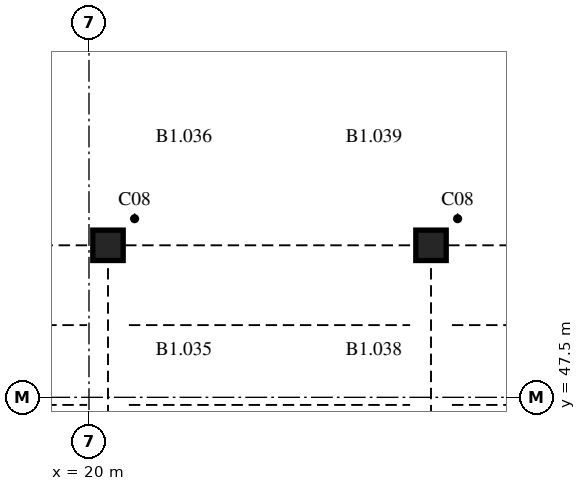
"""IFC4 building model, lengths in metres.
Left out: names, types, materials, properties, quantities, classifications, styles, units other than length and angle.
Written with IfcOpenShell. Run it as: python <this file> out.ifc"""

import sys

from ifc_helpers import new_model, si_unit, direction, frame, origin, origin_2d, place, context, subcontext, project, spatial, rectangle, extrude, element, save


model = new_model("IFC4")
c1 = context("Model", 3, precision=1e-05, world=origin(), true_north=direction((0.0, 1.0)))
c2 = subcontext(c1, "Body", "Model", "MODEL_VIEW")
j1 = project(units=[si_unit("LENGTHUNIT", "METRE"), si_unit("PLANEANGLEUNIT", "RADIAN")], contexts=[c1])
p1 = place(None, origin())
s1 = spatial("IfcSite", under=j1, at=p1, CompositionType="ELEMENT")
p2 = place(p1, origin())
s2 = spatial("IfcBuilding", under=s1, at=p2, CompositionType="ELEMENT")
p3 = place(p2, frame((0.0, 0.0, -4.0)))
s3 = spatial("IfcBuildingStorey", under=s2, at=p3, CompositionType="ELEMENT", Elevation=-4.0)
for number, where, z_axis, x_axis in (
    (1, (20.5, 51.5, 0.0), (0.0, 0.0, 1.0), (1.0, 0.0, 0.0)),
    (2, (29.0, 51.5, 0.0), (0.0, 0.0, 1.0), (1.0, 0.0, 0.0)),
):
    element("IfcColumn", number, at=place(p3, frame(where, z_axis=z_axis, x_axis=x_axis)), inside=s3, PredefinedType="COLUMN", context=c2, shape_type="SweptSolid", body=[
        extrude(rectangle(XDim=0.8, YDim=0.8, at=origin_2d()), origin(), (0.0, 0.0, 1.0), 3.6),
    ])
save(model, sys.argv[1])
